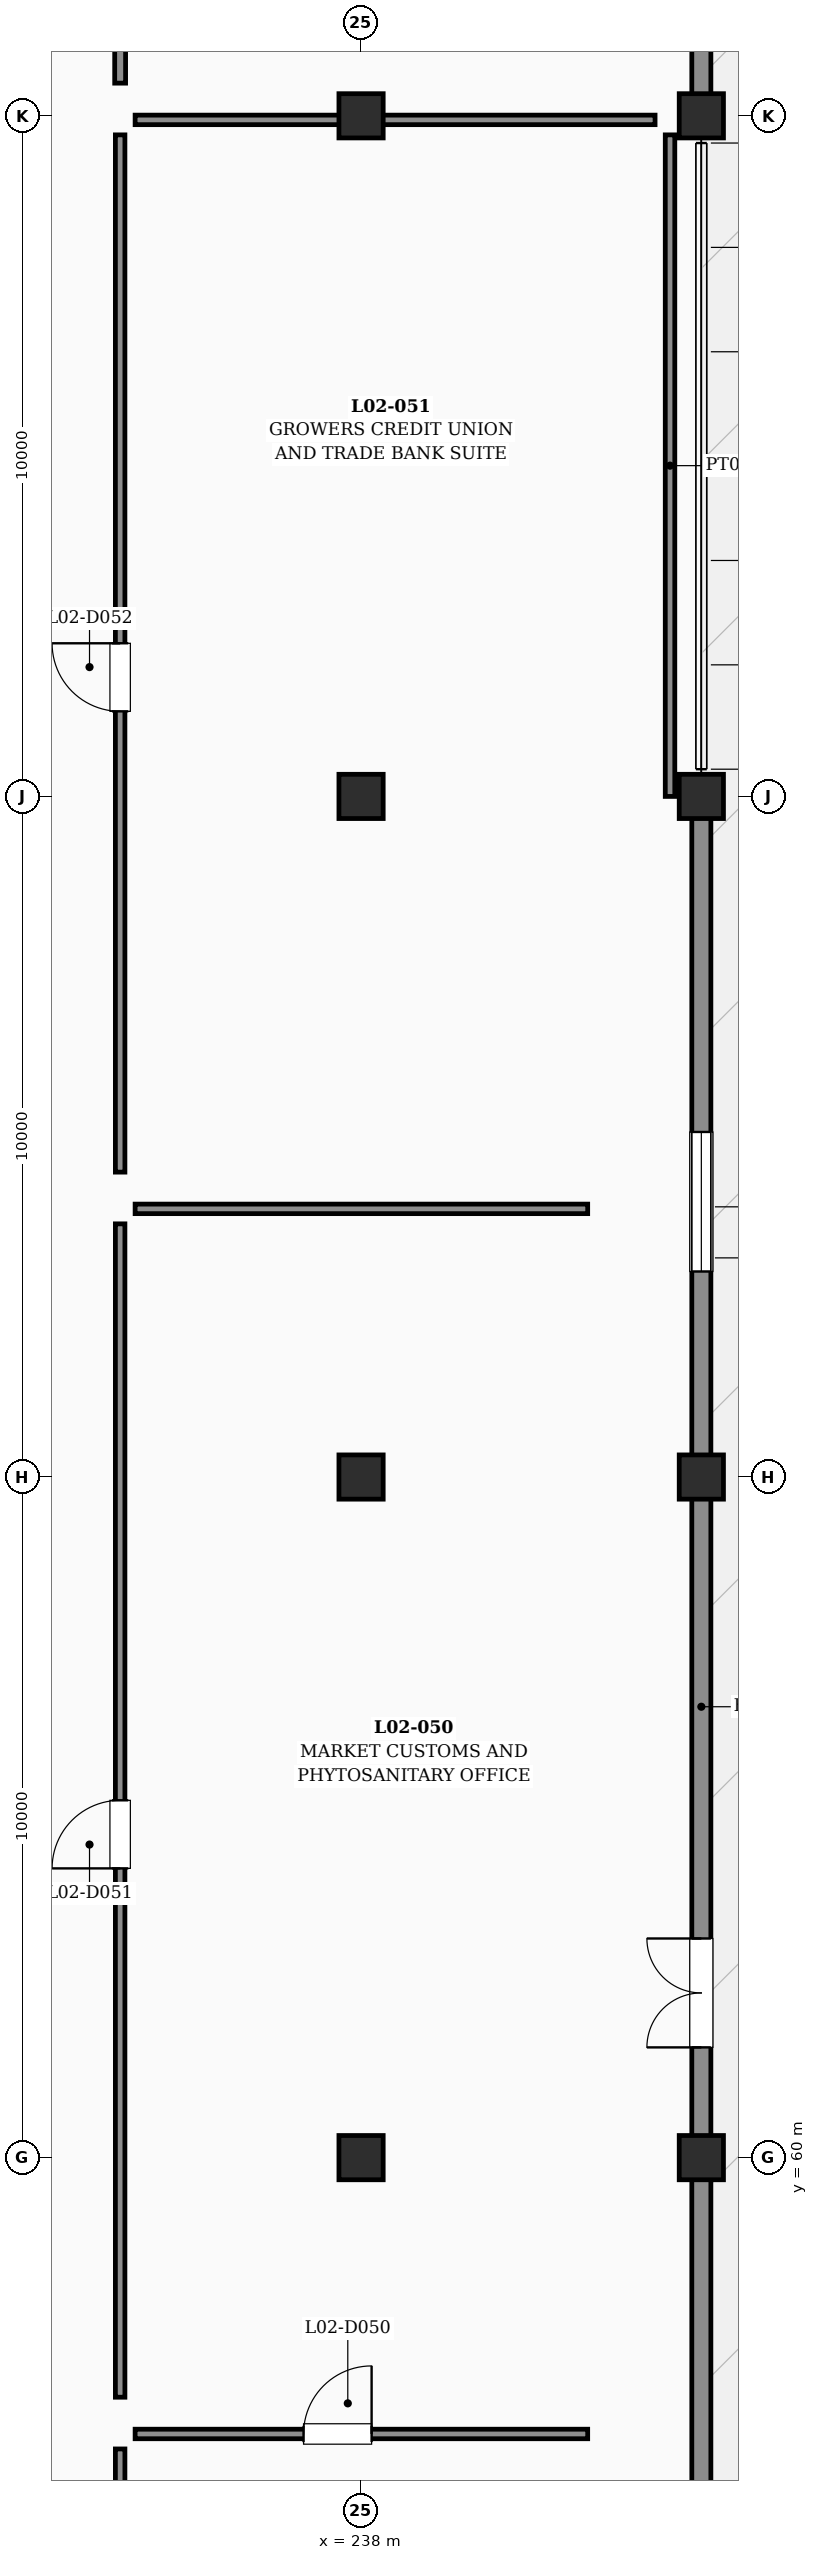
"""IFC4 building model, lengths in metres.
Left out: names, types, materials, properties, quantities, classifications, styles, units other than length and angle.
Written with IfcOpenShell. Run it as: python <this file> out.ifc"""

import sys

from ifc_helpers import new_model, si_unit, direction, frame, frame_2d, origin, origin_2d, place, context, subcontext, project, spatial, rectangle, extrude, element, fill, save


model = new_model("IFC4")
c1 = context("Model", 3, precision=1e-05, world=origin(), true_north=direction((0.0, 1.0)))
c2 = subcontext(c1, "Body", "Model", "MODEL_VIEW")
j1 = project(units=[si_unit("LENGTHUNIT", "METRE"), si_unit("PLANEANGLEUNIT", "RADIAN")], contexts=[c1])
p1 = place(None, origin())
s1 = spatial("IfcSite", under=j1, at=p1, CompositionType="ELEMENT")
p2 = place(p1, origin())
s2 = spatial("IfcBuilding", under=s1, at=p2, CompositionType="ELEMENT")
p3 = place(p2, frame((0.0, 0.0, 10.8)))
s3 = spatial("IfcBuildingStorey", under=s2, at=p3, CompositionType="ELEMENT", Elevation=10.8)
for number, where, z_axis, x_axis in (
    (1, (238.0, 60.0, 0.0), (0.0, 0.0, 1.0), (1.0, 0.0, 0.0)),
    (2, (238.0, 70.0, 0.0), (0.0, 0.0, 1.0), (1.0, 0.0, 0.0)),
    (3, (238.0, 80.0, 0.0), (0.0, 0.0, 1.0), (1.0, 0.0, 0.0)),
    (4, (238.0, 90.0, 0.0), (0.0, 0.0, 1.0), (1.0, 0.0, 0.0)),
    (5, (243.0, 60.0, 0.0), (0.0, 0.0, 1.0), (1.0, 0.0, 0.0)),
    (6, (243.0, 70.0, 0.0), (0.0, 0.0, 1.0), (1.0, 0.0, 0.0)),
    (7, (243.0, 80.0, 0.0), (0.0, 0.0, 1.0), (1.0, 0.0, 0.0)),
    (8, (243.0, 90.0, 0.0), (0.0, 0.0, 1.0), (1.0, 0.0, 0.0)),
):
    element("IfcColumn", number, at=place(p3, frame(where, z_axis=z_axis, x_axis=x_axis)), inside=s3, PredefinedType="COLUMN", context=c2, shape_type="SweptSolid", body=[
        extrude(rectangle(XDim=0.65, YDim=0.65, at=origin_2d()), origin(), (0.0, 0.0, 1.0), 4.2),
    ])
p4 = place(p3, frame((243.0, 50.22, 0.0), z_axis=(0.0, 0.0, 1.0), x_axis=(0.0, 1.0, 0.0)))
e9 = element("IfcWall", 9, at=p4, inside=s3, PredefinedType="SOLIDWALL", context=c2, shape_type="SweptSolid", body=[
    extrude(rectangle(XDim=9.56, YDim=0.28, at=frame_2d((4.78, 0.0))), origin(), (0.0, 0.0, 1.0), 3.16),
])
p5 = place(p4, frame((2.8, 0.0, 0.9)))
e10 = element("IfcOpeningElement", 10, at=p5, cuts=e9, PredefinedType="OPENING", context=c2, shape_type="SweptSolid", body=[
    extrude(rectangle(XDim=2.05, YDim=1.85, at=frame_2d((1.025, 0.925))), frame((0.0, 0.15, 0.0), z_axis=(0.0, -1.0, 0.0), x_axis=(1.0, 0.0, 0.0)), (0.0, 0.0, 1.0), 0.3),
])
p6 = place(p3, frame((243.0, 60.22, 0.0), z_axis=(0.0, 0.0, 1.0), x_axis=(0.0, 1.0, 0.0)))
e11 = element("IfcWall", 11, at=p6, inside=s3, PredefinedType="SOLIDWALL", context=c2, shape_type="SweptSolid", body=[
    extrude(rectangle(XDim=9.56, YDim=0.28, at=frame_2d((4.78, 0.0))), origin(), (0.0, 0.0, 1.0), 3.16),
])
p7 = place(p6, frame((1.4, 0.0, 0.0)))
e12 = element("IfcOpeningElement", 12, at=p7, cuts=e11, PredefinedType="OPENING", context=c2, shape_type="SweptSolid", body=[
    extrude(rectangle(XDim=1.6, YDim=2.3, at=frame_2d((0.8, 1.15))), frame((0.0, 0.15, 0.0), z_axis=(0.0, -1.0, 0.0), x_axis=(1.0, 0.0, 0.0)), (0.0, 0.0, 1.0), 0.3),
])
p8 = place(p3, frame((243.0, 70.22, 0.0), z_axis=(0.0, 0.0, 1.0), x_axis=(0.0, 1.0, 0.0)))
e13 = element("IfcWall", 13, at=p8, inside=s3, PredefinedType="SOLIDWALL", context=c2, shape_type="SweptSolid", body=[
    extrude(rectangle(XDim=9.56, YDim=0.28, at=frame_2d((4.78, 0.0))), origin(), (0.0, 0.0, 1.0), 3.16),
])
p9 = place(p8, frame((2.8, 0.0, 0.9)))
e14 = element("IfcOpeningElement", 14, at=p9, cuts=e13, PredefinedType="OPENING", context=c2, shape_type="SweptSolid", body=[
    extrude(rectangle(XDim=2.05, YDim=1.85, at=frame_2d((1.025, 0.925))), frame((0.0, 0.15, 0.0), z_axis=(0.0, -1.0, 0.0), x_axis=(1.0, 0.0, 0.0)), (0.0, 0.0, 1.0), 0.3),
])
p10 = place(p3, frame((243.0, 90.22, 0.0), z_axis=(0.0, 0.0, 1.0), x_axis=(0.0, 1.0, 0.0)))
e15 = element("IfcWall", 15, at=p10, inside=s3, PredefinedType="SOLIDWALL", context=c2, shape_type="SweptSolid", body=[
    extrude(rectangle(XDim=9.56, YDim=0.28, at=frame_2d((4.78, 0.0))), origin(), (0.0, 0.0, 1.0), 3.16),
])
p11 = place(p10, frame((2.8, 0.0, 0.9)))
e16 = element("IfcOpeningElement", 16, at=p11, cuts=e15, PredefinedType="OPENING", context=c2, shape_type="SweptSolid", body=[
    extrude(rectangle(XDim=2.05, YDim=1.85, at=frame_2d((1.025, 0.925))), frame((0.0, 0.15, 0.0), z_axis=(0.0, -1.0, 0.0), x_axis=(1.0, 0.0, 0.0)), (0.0, 0.0, 1.0), 0.3),
])
p12 = place(p3, frame((234.46, 50.556, 0.0), z_axis=(0.0, 0.0, 1.0), x_axis=(0.0, 1.0, 0.0)))
e17 = element("IfcWall", 17, at=p12, inside=s3, PredefinedType="PARTITIONING", context=c2, shape_type="SweptSolid", body=[
    extrude(rectangle(XDim=5.164, YDim=0.14, at=frame_2d((2.582, 0.0))), origin(), (0.0, 0.0, 1.0), 3.86),
])
p13 = place(p3, frame((234.68, 55.94, 0.0), z_axis=(0.0, 0.0, 1.0), x_axis=(1.0, 0.0, 0.0)))
e18 = element("IfcWall", 18, at=p13, inside=s3, PredefinedType="PARTITIONING", context=c2, shape_type="SweptSolid", body=[
    extrude(rectangle(XDim=6.65, YDim=0.14, at=frame_2d((3.325, 0.0))), origin(), (0.0, 0.0, 1.0), 3.86),
])
p14 = place(p13, frame((2.475, 0.0, 0.0)))
e19 = element("IfcOpeningElement", 19, at=p14, cuts=e18, PredefinedType="OPENING", context=c2, shape_type="SweptSolid", body=[
    extrude(rectangle(XDim=1.0, YDim=2.2, at=frame_2d((0.5, 1.1))), frame((0.0, 0.08, 0.0), z_axis=(0.0, -1.0, 0.0), x_axis=(1.0, 0.0, 0.0)), (0.0, 0.0, 1.0), 0.16),
])
p15 = place(p3, frame((234.46, 56.48, 0.0), z_axis=(0.0, 0.0, 1.0), x_axis=(0.0, 1.0, 0.0)))
e20 = element("IfcWall", 20, at=p15, inside=s3, PredefinedType="PARTITIONING", context=c2, shape_type="SweptSolid", body=[
    extrude(rectangle(XDim=17.24, YDim=0.14, at=frame_2d((8.62, 0.0))), origin(), (0.0, 0.0, 1.0), 3.86),
])
p16 = place(p15, frame((7.77, 0.0, 0.0)))
e21 = element("IfcOpeningElement", 21, at=p16, cuts=e20, PredefinedType="OPENING", context=c2, shape_type="SweptSolid", body=[
    extrude(rectangle(XDim=1.0, YDim=2.2, at=frame_2d((0.5, 1.1))), frame((0.0, 0.08, 0.0), z_axis=(0.0, -1.0, 0.0), x_axis=(1.0, 0.0, 0.0)), (0.0, 0.0, 1.0), 0.16),
])
p17 = place(p3, frame((234.68, 73.94, 0.0), z_axis=(0.0, 0.0, 1.0), x_axis=(1.0, 0.0, 0.0)))
e22 = element("IfcWall", 22, at=p17, inside=s3, PredefinedType="PARTITIONING", context=c2, shape_type="SweptSolid", body=[
    extrude(rectangle(XDim=6.65, YDim=0.14, at=frame_2d((3.325, 0.0))), origin(), (0.0, 0.0, 1.0), 3.86),
])
p18 = place(p3, frame((234.46, 74.48, 0.0), z_axis=(0.0, 0.0, 1.0), x_axis=(0.0, 1.0, 0.0)))
e23 = element("IfcWall", 23, at=p18, inside=s3, PredefinedType="PARTITIONING", context=c2, shape_type="SweptSolid", body=[
    extrude(rectangle(XDim=15.24, YDim=0.14, at=frame_2d((7.62, 0.0))), origin(), (0.0, 0.0, 1.0), 3.86),
])
p19 = place(p18, frame((6.77, 0.0, 0.0)))
e24 = element("IfcOpeningElement", 24, at=p19, cuts=e23, PredefinedType="OPENING", context=c2, shape_type="SweptSolid", body=[
    extrude(rectangle(XDim=1.0, YDim=2.2, at=frame_2d((0.5, 1.1))), frame((0.0, 0.08, 0.0), z_axis=(0.0, -1.0, 0.0), x_axis=(1.0, 0.0, 0.0)), (0.0, 0.0, 1.0), 0.16),
])
p20 = place(p3, frame((234.68, 89.94, 0.0), z_axis=(0.0, 0.0, 1.0), x_axis=(1.0, 0.0, 0.0)))
e25 = element("IfcWall", 25, at=p20, inside=s3, PredefinedType="PARTITIONING", context=c2, shape_type="SweptSolid", body=[
    extrude(rectangle(XDim=7.64, YDim=0.14, at=frame_2d((3.82, 0.0))), origin(), (0.0, 0.0, 1.0), 3.11),
])
p21 = place(p3, frame((242.54, 89.72, 0.0), z_axis=(0.0, 0.0, 1.0), x_axis=(0.0, -1.0, 0.0)))
e26 = element("IfcWall", 26, at=p21, inside=s3, PredefinedType="PARTITIONING", context=c2, shape_type="SweptSolid", body=[
    extrude(rectangle(XDim=9.72, YDim=0.14, at=frame_2d((4.86, 0.0))), origin(), (0.0, 0.0, 1.0), 3.86),
])
p22 = place(p3, frame((234.46, 90.48, 0.0), z_axis=(0.0, 0.0, 1.0), x_axis=(0.0, 1.0, 0.0)))
e27 = element("IfcWall", 27, at=p22, inside=s3, PredefinedType="PARTITIONING", context=c2, shape_type="SweptSolid", body=[
    extrude(rectangle(XDim=7.85, YDim=0.16, at=frame_2d((3.925, 0.0))), origin(), (0.0, 0.0, 1.0), 3.86),
])
p23 = place(p22, frame((3.075, 0.0, 0.0)))
e28 = element("IfcOpeningElement", 28, at=p23, cuts=e27, PredefinedType="OPENING", context=c2, shape_type="SweptSolid", body=[
    extrude(rectangle(XDim=0.95, YDim=2.15, at=frame_2d((0.475, 1.075))), frame((0.0, 0.09, 0.0), z_axis=(0.0, -1.0, 0.0), x_axis=(1.0, 0.0, 0.0)), (0.0, 0.0, 1.0), 0.18),
])
p24 = place(p7, origin())
e29 = element("IfcDoor", 29, at=p24, inside=s3, OperationType="DOUBLE_DOOR_SINGLE_SWING", PredefinedType="DOOR", context=c2, shape_type="SweptSolid", body=[
    extrude(rectangle(XDim=1.6, YDim=2.3, at=frame_2d((0.8, 1.15))), frame((0.0, 0.025, 0.0), z_axis=(0.0, -1.0, 0.0), x_axis=(1.0, 0.0, 0.0)), (0.0, 0.0, 1.0), 0.05),
])
fill(e12, e29)
p25 = place(p9, origin())
e30 = element("IfcWindow", 30, at=p25, inside=s3, PartitioningType="SINGLE_PANEL", PredefinedType="WINDOW", context=c2, shape_type="SweptSolid", body=[
    extrude(rectangle(XDim=2.05, YDim=1.85, at=frame_2d((1.025, 0.925))), frame((0.0, 0.03, 0.0), z_axis=(0.0, -1.0, 0.0), x_axis=(1.0, 0.0, 0.0)), (0.0, 0.0, 1.0), 0.06),
])
fill(e14, e30)
p26 = place(p14, origin())
e31 = element("IfcDoor", 31, at=p26, inside=s3, OperationType="SINGLE_SWING_RIGHT", PredefinedType="DOOR", context=c2, shape_type="SweptSolid", body=[
    extrude(rectangle(XDim=1.0, YDim=2.2, at=frame_2d((0.5, 1.1))), frame((0.0, 0.025, 0.0), z_axis=(0.0, -1.0, 0.0), x_axis=(1.0, 0.0, 0.0)), (0.0, 0.0, 1.0), 0.05),
])
fill(e19, e31)
p27 = place(p16, origin())
e32 = element("IfcDoor", 32, at=p27, inside=s3, OperationType="SINGLE_SWING_LEFT", PredefinedType="DOOR", context=c2, shape_type="SweptSolid", body=[
    extrude(rectangle(XDim=1.0, YDim=2.2, at=frame_2d((0.5, 1.1))), frame((0.0, 0.025, 0.0), z_axis=(0.0, -1.0, 0.0), x_axis=(1.0, 0.0, 0.0)), (0.0, 0.0, 1.0), 0.05),
])
fill(e21, e32)
p28 = place(p19, origin())
e33 = element("IfcDoor", 33, at=p28, inside=s3, OperationType="SINGLE_SWING_RIGHT", PredefinedType="DOOR", context=c2, shape_type="SweptSolid", body=[
    extrude(rectangle(XDim=1.0, YDim=2.2, at=frame_2d((0.5, 1.1))), frame((0.0, 0.025, 0.0), z_axis=(0.0, -1.0, 0.0), x_axis=(1.0, 0.0, 0.0)), (0.0, 0.0, 1.0), 0.05),
])
fill(e24, e33)
save(model, sys.argv[1])
